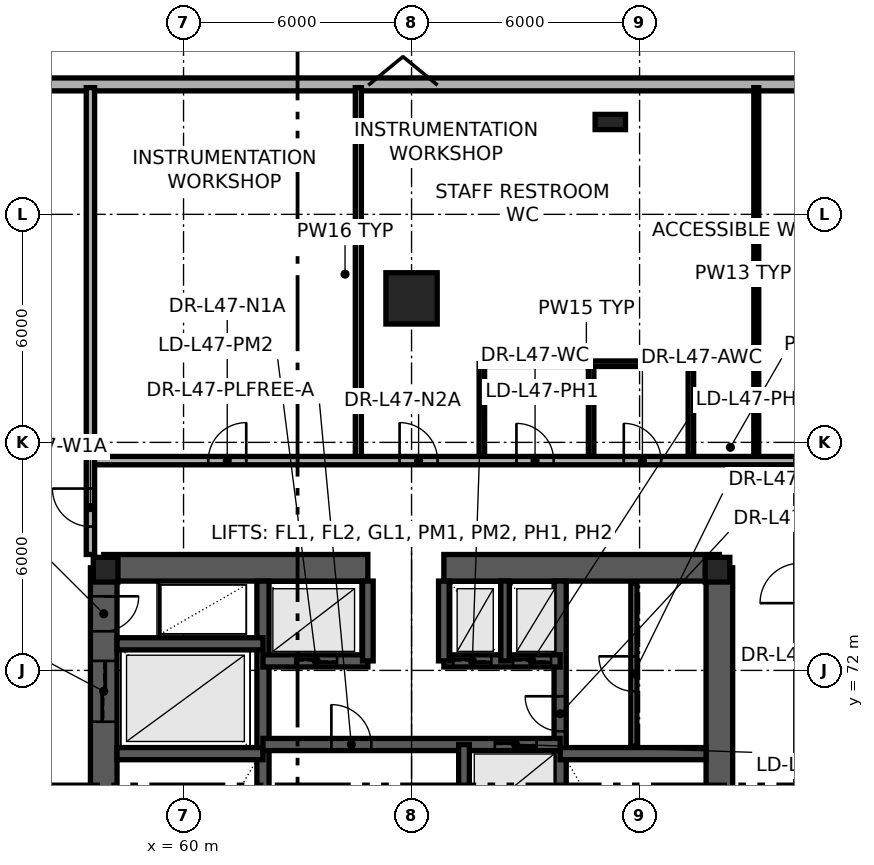
"""IFC4 building model, lengths in metres.
Left out: names, types, materials, properties, quantities, classifications, styles, units other than length and angle.
Written with IfcOpenShell. Run it as: python <this file> out.ifc"""

import sys

from ifc_helpers import new_model, si_unit, direction, frame, frame_2d, origin, origin_2d, place, context, subcontext, project, spatial, rectangle, extrude, element, fill, save


model = new_model("IFC4")
c1 = context("Model", 3, precision=1e-05, world=origin(), true_north=direction((0.0, 1.0)))
c2 = subcontext(c1, "Body", "Model", "MODEL_VIEW")
j1 = project(units=[si_unit("LENGTHUNIT", "METRE"), si_unit("PLANEANGLEUNIT", "RADIAN")], contexts=[c1])
p1 = place(None, origin())
s1 = spatial("IfcSite", under=j1, at=p1, CompositionType="ELEMENT")
p2 = place(p1, origin())
s2 = spatial("IfcBuilding", under=s1, at=p2, CompositionType="ELEMENT")
p3 = place(p2, frame((0.0, 0.0, 179.4)))
s3 = spatial("IfcBuildingStorey", under=s2, at=p3, CompositionType="ELEMENT", Elevation=179.4)
p4 = place(p3, frame((74.1, 61.3, 0.0), z_axis=(0.0, 0.0, 1.0), x_axis=(0.0, 1.0, 0.0)))
e1 = element("IfcWall", 1, at=p4, inside=s3, PredefinedType="SHEAR", context=c2, shape_type="SweptSolid", body=[
    extrude(rectangle(XDim=13.4, YDim=0.7, at=frame_2d((6.7, 0.0))), origin(), (0.0, 0.0, 1.0), 3.65),
])
p5 = place(p3, frame((74.1, 74.7, 0.0), z_axis=(0.0, 0.0, 1.0), x_axis=(-1.0, 0.0, 0.0)))
e2 = element("IfcWall", 2, at=p5, inside=s3, PredefinedType="SHEAR", context=c2, shape_type="SweptSolid", body=[
    extrude(rectangle(XDim=7.25, YDim=0.7, at=frame_2d((3.625, 0.0))), origin(), (0.0, 0.0, 1.0), 3.65),
])
p6 = place(p3, frame((64.85, 74.7, 0.0), z_axis=(0.0, 0.0, 1.0), x_axis=(-1.0, 0.0, 0.0)))
e3 = element("IfcWall", 3, at=p6, inside=s3, PredefinedType="SHEAR", context=c2, shape_type="SweptSolid", body=[
    extrude(rectangle(XDim=6.95, YDim=0.7, at=frame_2d((3.475, 0.0))), origin(), (0.0, 0.0, 1.0), 3.65),
])
p7 = place(p3, frame((57.9, 74.7, 0.0), z_axis=(0.0, 0.0, 1.0), x_axis=(0.0, -1.0, 0.0)))
e4 = element("IfcWall", 4, at=p7, inside=s3, PredefinedType="SHEAR", context=c2, shape_type="SweptSolid", body=[
    extrude(rectangle(XDim=13.4, YDim=0.7, at=frame_2d((6.7, 0.0))), origin(), (0.0, 0.0, 1.0), 3.65),
])
p8 = place(p7, frame((0.75, 0.0, 0.0)))
e5 = element("IfcOpeningElement", 5, at=p8, cuts=e4, PredefinedType="OPENING", context=c2, shape_type="SweptSolid", body=[
    extrude(rectangle(XDim=0.92, YDim=2.05, at=frame_2d((0.46, 1.025))), frame((0.0, 0.36, 0.0), z_axis=(0.0, -1.0, 0.0), x_axis=(1.0, 0.0, 0.0)), (0.0, 0.0, 1.0), 0.72),
])
p9 = place(p7, frame((2.45, 0.0, 0.0)))
e6 = element("IfcOpeningElement", 6, at=p9, cuts=e4, PredefinedType="OPENING", context=c2, shape_type="SweptSolid", body=[
    extrude(rectangle(XDim=1.6, YDim=2.3, at=frame_2d((0.8, 1.15))), frame((0.0, 0.36, 0.0), z_axis=(0.0, -1.0, 0.0), x_axis=(1.0, 0.0, 0.0)), (0.0, 0.0, 1.0), 0.72),
])
p10 = place(p3, frame((62.09, 61.65, 0.0), z_axis=(0.0, 0.0, 1.0), x_axis=(0.0, 1.0, 0.0)))
e7 = element("IfcWall", 7, at=p10, inside=s3, PredefinedType="SHEAR", context=c2, shape_type="SweptSolid", body=[
    extrude(rectangle(XDim=12.7, YDim=0.32, at=frame_2d((6.35, 0.0))), origin(), (0.0, 0.0, 1.0), 3.65),
])
p11 = place(p10, frame((0.55, 0.0, 0.0)))
e8 = element("IfcOpeningElement", 8, at=p11, cuts=e7, PredefinedType="OPENING", context=c2, shape_type="SweptSolid", body=[
    extrude(rectangle(XDim=1.15, YDim=2.15, at=frame_2d((0.575, 1.075))), frame((0.0, 0.17, 0.0), z_axis=(0.0, -1.0, 0.0), x_axis=(1.0, 0.0, 0.0)), (0.0, 0.0, 1.0), 0.34),
])
p12 = place(p3, frame((69.91, 61.65, 0.0), z_axis=(0.0, 0.0, 1.0), x_axis=(0.0, 1.0, 0.0)))
e9 = element("IfcWall", 9, at=p12, inside=s3, PredefinedType="SHEAR", context=c2, shape_type="SweptSolid", body=[
    extrude(rectangle(XDim=12.7, YDim=0.32, at=frame_2d((6.35, 0.0))), origin(), (0.0, 0.0, 1.0), 3.65),
])
p13 = place(p12, frame((8.75, 0.0, 0.0)))
e10 = element("IfcOpeningElement", 10, at=p13, cuts=e9, PredefinedType="OPENING", context=c2, shape_type="SweptSolid", body=[
    extrude(rectangle(XDim=0.92, YDim=2.05, at=frame_2d((0.46, 1.025))), frame((0.0, 0.17, 0.0), z_axis=(0.0, -1.0, 0.0), x_axis=(1.0, 0.0, 0.0)), (0.0, 0.0, 1.0), 0.34),
])
for number, where, z_axis, x_axis in (
    (11, (58.25, 69.81, 0.0), (0.0, 0.0, 1.0), (1.0, 0.0, 0.0)),
    (12, (69.91, 69.81, 0.0), (0.0, 0.0, 1.0), (1.0, 0.0, 0.0)),
    (13, (58.25, 72.7, 0.0), (0.0, 0.0, 1.0), (1.0, 0.0, 0.0)),
):
    element("IfcWall", number, at=place(p3, frame(where, z_axis=z_axis, x_axis=x_axis)), inside=s3, PredefinedType="SHEAR", context=c2, shape_type="SweptSolid", body=[
        extrude(rectangle(XDim=3.84, YDim=0.32, at=frame_2d((1.92, 0.0))), origin(), (0.0, 0.0, 1.0), 3.65),
    ])
p14 = place(p3, frame((62.09, 70.05, 0.0), z_axis=(0.0, 0.0, 1.0), x_axis=(1.0, 0.0, 0.0)))
e14 = element("IfcWall", 14, at=p14, inside=s3, PredefinedType="SHEAR", context=c2, shape_type="SweptSolid", body=[
    extrude(rectangle(XDim=7.82, YDim=0.32, at=frame_2d((3.91, 0.0))), origin(), (0.0, 0.0, 1.0), 3.65),
])
p15 = place(p14, frame((1.8, 0.0, 0.0)))
e15 = element("IfcOpeningElement", 15, at=p15, cuts=e14, PredefinedType="OPENING", context=c2, shape_type="SweptSolid", body=[
    extrude(rectangle(XDim=1.05, YDim=2.15, at=frame_2d((0.525, 1.075))), frame((0.0, 0.17, 0.0), z_axis=(0.0, -1.0, 0.0), x_axis=(1.0, 0.0, 0.0)), (0.0, 0.0, 1.0), 0.34),
])
p16 = place(p14, frame((6.1, 0.0, 0.0)))
e16 = element("IfcOpeningElement", 16, at=p16, cuts=e14, PredefinedType="OPENING", context=c2, shape_type="SweptSolid", body=[
    extrude(rectangle(XDim=1.1, YDim=2.2, at=frame_2d((0.55, 1.1))), frame((0.0, 0.17, 0.0), z_axis=(0.0, -1.0, 0.0), x_axis=(1.0, 0.0, 0.0)), (0.0, 0.0, 1.0), 0.34),
])
p17 = place(p3, frame((62.09, 72.25, 0.0), z_axis=(0.0, 0.0, 1.0), x_axis=(1.0, 0.0, 0.0)))
e17 = element("IfcWall", 17, at=p17, inside=s3, PredefinedType="SHEAR", context=c2, shape_type="SweptSolid", body=[
    extrude(rectangle(XDim=2.76, YDim=0.32, at=frame_2d((1.38, 0.0))), origin(), (0.0, 0.0, 1.0), 3.65),
])
p18 = place(p17, frame((0.85, 0.0, 0.0)))
e18 = element("IfcOpeningElement", 18, at=p18, cuts=e17, PredefinedType="OPENING", context=c2, shape_type="SweptSolid", body=[
    extrude(rectangle(XDim=1.1, YDim=2.2, at=frame_2d((0.55, 1.1))), frame((0.0, 0.17, 0.0), z_axis=(0.0, -1.0, 0.0), x_axis=(1.0, 0.0, 0.0)), (0.0, 0.0, 1.0), 0.34),
])
p19 = place(p3, frame((66.85, 72.25, 0.0), z_axis=(0.0, 0.0, 1.0), x_axis=(1.0, 0.0, 0.0)))
e19 = element("IfcWall", 19, at=p19, inside=s3, PredefinedType="SHEAR", context=c2, shape_type="SweptSolid", body=[
    extrude(rectangle(XDim=3.06, YDim=0.32, at=frame_2d((1.53, 0.0))), origin(), (0.0, 0.0, 1.0), 3.65),
])
p20 = place(p19, frame((0.25, 0.0, 0.0)))
e20 = element("IfcOpeningElement", 20, at=p20, cuts=e19, PredefinedType="OPENING", context=c2, shape_type="SweptSolid", body=[
    extrude(rectangle(XDim=1.0, YDim=2.2, at=frame_2d((0.5, 1.1))), frame((0.0, 0.17, 0.0), z_axis=(0.0, -1.0, 0.0), x_axis=(1.0, 0.0, 0.0)), (0.0, 0.0, 1.0), 0.34),
])
p21 = place(p19, frame((1.82, 0.0, 0.0)))
e21 = element("IfcOpeningElement", 21, at=p21, cuts=e19, PredefinedType="OPENING", context=c2, shape_type="SweptSolid", body=[
    extrude(rectangle(XDim=1.0, YDim=2.2, at=frame_2d((0.5, 1.1))), frame((0.0, 0.17, 0.0), z_axis=(0.0, -1.0, 0.0), x_axis=(1.0, 0.0, 0.0)), (0.0, 0.0, 1.0), 0.34),
])
for number, where, z_axis, x_axis in (
    (22, (64.85, 72.25, 0.0), (0.0, 0.0, 1.0), (0.0, 1.0, 0.0)),
    (23, (66.85, 72.25, 0.0), (0.0, 0.0, 1.0), (0.0, 1.0, 0.0)),
):
    element("IfcWall", number, at=place(p3, frame(where, z_axis=z_axis, x_axis=x_axis)), inside=s3, PredefinedType="SHEAR", context=c2, shape_type="SweptSolid", body=[
        extrude(rectangle(XDim=2.1, YDim=0.28, at=frame_2d((1.05, 0.0))), origin(), (0.0, 0.0, 1.0), 3.65),
    ])
p22 = place(p3, frame((68.46, 72.25, 0.0), z_axis=(0.0, 0.0, 1.0), x_axis=(0.0, 1.0, 0.0)))
e24 = element("IfcWall", 24, at=p22, inside=s3, PredefinedType="SHEAR", context=c2, shape_type="SweptSolid", body=[
    extrude(rectangle(XDim=2.1, YDim=0.22, at=frame_2d((1.05, 0.0))), origin(), (0.0, 0.0, 1.0), 3.65),
])
p23 = place(p3, frame((67.38, 67.8, 0.0), z_axis=(0.0, 0.0, 1.0), x_axis=(0.0, 1.0, 0.0)))
e25 = element("IfcWall", 25, at=p23, inside=s3, PredefinedType="SHEAR", context=c2, shape_type="SweptSolid", body=[
    extrude(rectangle(XDim=2.25, YDim=0.28, at=frame_2d((1.125, 0.0))), origin(), (0.0, 0.0, 1.0), 3.65),
])
for number, where, z_axis, x_axis in (
    (26, (74.05, 74.65, 0.0), (0.0, 0.0, 1.0), (1.0, 0.0, 0.0)),
    (27, (57.95, 74.65, 0.0), (0.0, 0.0, 1.0), (1.0, 0.0, 0.0)),
):
    element("IfcColumn", number, at=place(p3, frame(where, z_axis=z_axis, x_axis=x_axis)), inside=s3, PredefinedType="COLUMN", context=c2, shape_type="SweptSolid", body=[
        extrude(rectangle(XDim=0.65, YDim=0.65, at=origin_2d()), origin(), (0.0, 0.0, 1.0), 3.65),
    ])
p24 = place(p3, frame((66.0, 81.789, 0.0), z_axis=(0.0, 0.0, 1.0), x_axis=(1.0, 0.0, 0.0)))
e28 = element("IfcColumn", 28, at=p24, inside=s3, PredefinedType="COLUMN", context=c2, shape_type="SweptSolid", body=[
    extrude(rectangle(XDim=1.35, YDim=1.35, at=origin_2d()), origin(), (0.0, 0.0, 1.0), 3.65),
])
p25 = place(p3, frame((71.252, 86.491, 0.003), z_axis=(-0.01238655289, -0.033544124313, 0.999360478022), x_axis=(-0.9380871136, 0.346399433166, 0.0)))
e29 = element("IfcColumn", 29, at=p25, inside=s3, PredefinedType="PILASTER", context=c2, shape_type="SweptSolid", body=[
    extrude(rectangle(XDim=0.8, YDim=0.4, at=origin_2d()), origin(), (0.0, 0.0, 1.0), 3.646),
])
p26 = place(p3, frame((61.232, 30.296, 0.0), z_axis=(0.0, 0.0, 1.0), x_axis=(-0.399091286562, 0.916911197985, 0.0)))
e30 = element("IfcWall", 30, at=p26, inside=s3, PredefinedType="STANDARD", context=c2, shape_type="SweptSolid", body=[
    extrude(rectangle(XDim=54.364, YDim=0.34, at=frame_2d((27.182, 0.0))), origin(), (0.0, 0.0, 1.0), 0.85),
])
p27 = place(p3, frame((44.304, 87.419, 0.0), z_axis=(0.0, 0.0, 1.0), x_axis=(1.0, 0.0, 0.0)))
e31 = element("IfcWall", 31, at=p27, inside=s3, PredefinedType="STANDARD", context=c2, shape_type="SweptSolid", body=[
    extrude(rectangle(XDim=43.393, YDim=0.34, at=frame_2d((21.696, 0.0))), origin(), (0.0, 0.0, 1.0), 0.85),
])
p28 = place(p3, frame((92.464, 80.144, 0.0), z_axis=(0.0, 0.0, 1.0), x_axis=(-0.399091286562, -0.916911197985, 0.0)))
e32 = element("IfcWall", 32, at=p28, inside=s3, PredefinedType="STANDARD", context=c2, shape_type="SweptSolid", body=[
    extrude(rectangle(XDim=54.364, YDim=0.34, at=frame_2d((27.182, 0.0))), origin(), (0.0, 0.0, 1.0), 0.85),
])
p29 = place(p3, frame((71.85, 70.0, 0.0), z_axis=(0.0, 0.0, 1.0), x_axis=(0.0, 1.0, 0.0)))
e33 = element("IfcWall", 33, at=p29, inside=s3, PredefinedType="PARTITIONING", context=c2, shape_type="SweptSolid", body=[
    extrude(rectangle(XDim=4.3, YDim=0.16, at=frame_2d((2.15, 0.0))), origin(), (0.0, 0.0, 1.0), 3.4),
])
p30 = place(p29, frame((1.45, 0.0, 0.0)))
e34 = element("IfcOpeningElement", 34, at=p30, cuts=e33, PredefinedType="OPENING", context=c2, shape_type="SweptSolid", body=[
    extrude(rectangle(XDim=0.92, YDim=2.05, at=frame_2d((0.46, 1.025))), frame((0.0, 0.09, 0.0), z_axis=(0.0, -1.0, 0.0), x_axis=(1.0, 0.0, 0.0)), (0.0, 0.0, 1.0), 0.18),
])
for number, where, z_axis, x_axis in (
    (35, (67.85, 77.52, 0.0), (0.0, 0.0, 1.0), (0.0, 1.0, 0.0)),
    (36, (70.725, 77.52, 0.0), (0.0, 0.0, 1.0), (0.0, 1.0, 0.0)),
):
    element("IfcWall", number, at=place(p3, frame(where, z_axis=z_axis, x_axis=x_axis)), inside=s3, PredefinedType="PARTITIONING", context=c2, shape_type="SweptSolid", body=[
        extrude(rectangle(XDim=2.55, YDim=0.145, at=frame_2d((1.275, 0.0))), origin(), (0.0, 0.0, 1.0), 2.78),
    ])
p31 = place(p3, frame((73.35, 77.52, 0.0), z_axis=(0.0, 0.0, 1.0), x_axis=(0.0, 1.0, 0.0)))
e37 = element("IfcWall", 37, at=p31, inside=s3, PredefinedType="PARTITIONING", context=c2, shape_type="SweptSolid", body=[
    extrude(rectangle(XDim=2.55, YDim=0.145, at=frame_2d((1.275, 0.0))), origin(), (0.0, 0.0, 1.0), 3.4),
])
p32 = place(p3, frame((67.85, 80.07, 0.0), z_axis=(0.0, 0.0, 1.0), x_axis=(1.0, 0.0, 0.0)))
e38 = element("IfcWall", 38, at=p32, inside=s3, PredefinedType="PARTITIONING", context=c2, shape_type="SweptSolid", body=[
    extrude(rectangle(XDim=5.5, YDim=0.145, at=frame_2d((2.75, 0.0))), origin(), (0.0, 0.0, 1.0), 2.78),
])
p33 = place(p3, frame((64.6, 77.52, 0.0), z_axis=(0.0, 0.0, 1.0), x_axis=(0.0, 1.0, 0.0)))
e39 = element("IfcWall", 39, at=p33, inside=s3, PredefinedType="PARTITIONING", context=c2, shape_type="SweptSolid", body=[
    extrude(rectangle(XDim=9.814, YDim=0.16, at=frame_2d((4.907, 0.0))), origin(), (0.0, 0.0, 1.0), 2.6),
])
p34 = place(p3, frame((75.071, 77.52, 0.0), z_axis=(0.0, 0.0, 1.0), x_axis=(0.0, 1.0, 0.0)))
e40 = element("IfcWall", 40, at=p34, inside=s3, PredefinedType="PARTITIONING", context=c2, shape_type="SweptSolid", body=[
    extrude(rectangle(XDim=9.814, YDim=0.13, at=frame_2d((4.907, 0.0))), origin(), (0.0, 0.0, 1.0), 2.6),
])
p35 = place(p3, frame((57.55, 77.52, 0.0), z_axis=(0.0, 0.0, 1.0), x_axis=(1.0, 0.0, 0.0)))
e41 = element("IfcWall", 41, at=p35, inside=s3, PredefinedType="PARTITIONING", context=c2, shape_type="SweptSolid", body=[
    extrude(rectangle(XDim=33.679, YDim=0.22, at=frame_2d((16.84, 0.0))), origin(), (0.0, 0.0, 1.0), 2.6),
])
p36 = place(p35, frame((11.21, 0.0, 0.0)))
e42 = element("IfcOpeningElement", 42, at=p36, cuts=e41, PredefinedType="OPENING", context=c2, shape_type="SweptSolid", body=[
    extrude(rectangle(XDim=0.98, YDim=2.1, at=frame_2d((0.49, 1.05))), frame((0.0, 0.12, 0.0), z_axis=(0.0, -1.0, 0.0), x_axis=(1.0, 0.0, 0.0)), (0.0, 0.0, 1.0), 0.24),
])
p37 = place(p35, frame((14.035, 0.0, 0.0)))
e43 = element("IfcOpeningElement", 43, at=p37, cuts=e41, PredefinedType="OPENING", context=c2, shape_type="SweptSolid", body=[
    extrude(rectangle(XDim=0.98, YDim=2.1, at=frame_2d((0.49, 1.05))), frame((0.0, 0.12, 0.0), z_axis=(0.0, -1.0, 0.0), x_axis=(1.0, 0.0, 0.0)), (0.0, 0.0, 1.0), 0.24),
])
p38 = place(p35, frame((3.1, 0.0, 0.0)))
e44 = element("IfcOpeningElement", 44, at=p38, cuts=e41, PredefinedType="OPENING", context=c2, shape_type="SweptSolid", body=[
    extrude(rectangle(XDim=1.0, YDim=2.1, at=frame_2d((0.5, 1.05))), frame((0.0, 0.12, 0.0), z_axis=(0.0, -1.0, 0.0), x_axis=(1.0, 0.0, 0.0)), (0.0, 0.0, 1.0), 0.24),
])
p39 = place(p35, frame((8.135, 0.0, 0.0)))
e45 = element("IfcOpeningElement", 45, at=p39, cuts=e41, PredefinedType="OPENING", context=c2, shape_type="SweptSolid", body=[
    extrude(rectangle(XDim=1.0, YDim=2.1, at=frame_2d((0.5, 1.05))), frame((0.0, 0.12, 0.0), z_axis=(0.0, -1.0, 0.0), x_axis=(1.0, 0.0, 0.0)), (0.0, 0.0, 1.0), 0.24),
])
p40 = place(p35, frame((21.401, 0.0, 0.0)))
e46 = element("IfcOpeningElement", 46, at=p40, cuts=e41, PredefinedType="OPENING", context=c2, shape_type="SweptSolid", body=[
    extrude(rectangle(XDim=1.0, YDim=2.1, at=frame_2d((0.5, 1.05))), frame((0.0, 0.12, 0.0), z_axis=(0.0, -1.0, 0.0), x_axis=(1.0, 0.0, 0.0)), (0.0, 0.0, 1.0), 0.24),
])
p41 = place(p35, frame((29.405, 0.0, 0.0)))
e47 = element("IfcOpeningElement", 47, at=p41, cuts=e41, PredefinedType="OPENING", context=c2, shape_type="SweptSolid", body=[
    extrude(rectangle(XDim=1.0, YDim=2.1, at=frame_2d((0.5, 1.05))), frame((0.0, 0.12, 0.0), z_axis=(0.0, -1.0, 0.0), x_axis=(1.0, 0.0, 0.0)), (0.0, 0.0, 1.0), 0.24),
])
p42 = place(p3, frame((57.55, 75.05, 0.0), z_axis=(0.0, 0.0, 1.0), x_axis=(0.0, 1.0, 0.0)))
e48 = element("IfcWall", 48, at=p42, inside=s3, PredefinedType="PARTITIONING", context=c2, shape_type="SweptSolid", body=[
    extrude(rectangle(XDim=12.284, YDim=0.22, at=frame_2d((6.142, 0.0))), origin(), (0.0, 0.0, 1.0), 2.6),
])
p43 = place(p42, frame((0.735, 0.0, 0.0)))
e49 = element("IfcOpeningElement", 49, at=p43, cuts=e48, PredefinedType="OPENING", context=c2, shape_type="SweptSolid", body=[
    extrude(rectangle(XDim=1.0, YDim=2.1, at=frame_2d((0.5, 1.05))), frame((0.0, 0.12, 0.0), z_axis=(0.0, -1.0, 0.0), x_axis=(1.0, 0.0, 0.0)), (0.0, 0.0, 1.0), 0.24),
])
p44 = place(p15, origin())
e50 = element("IfcDoor", 50, at=p44, inside=s3, OperationType="SINGLE_SWING_LEFT", PredefinedType="DOOR", context=c2, shape_type="SweptSolid", body=[
    extrude(rectangle(XDim=1.05, YDim=2.15, at=frame_2d((0.525, 1.075))), frame((0.0, 0.025, 0.0), z_axis=(0.0, -1.0, 0.0), x_axis=(1.0, 0.0, 0.0)), (0.0, 0.0, 1.0), 0.05),
])
fill(e15, e50)
p45 = place(p16, origin())
e51 = element("IfcDoor", 51, at=p45, inside=s3, OperationType="SLIDING_TO_LEFT", PredefinedType="DOOR", context=c2, shape_type="SweptSolid", body=[
    extrude(rectangle(XDim=1.1, YDim=2.2, at=frame_2d((0.55, 1.1))), frame((0.0, 0.025, 0.0), z_axis=(0.0, -1.0, 0.0), x_axis=(1.0, 0.0, 0.0)), (0.0, 0.0, 1.0), 0.05),
])
fill(e16, e51)
p46 = place(p18, origin())
e52 = element("IfcDoor", 52, at=p46, inside=s3, OperationType="SLIDING_TO_LEFT", PredefinedType="DOOR", context=c2, shape_type="SweptSolid", body=[
    extrude(rectangle(XDim=1.1, YDim=2.2, at=frame_2d((0.55, 1.1))), frame((0.0, 0.025, 0.0), z_axis=(0.0, -1.0, 0.0), x_axis=(1.0, 0.0, 0.0)), (0.0, 0.0, 1.0), 0.05),
])
fill(e18, e52)
p47 = place(p20, origin())
e53 = element("IfcDoor", 53, at=p47, inside=s3, OperationType="SLIDING_TO_LEFT", PredefinedType="DOOR", context=c2, shape_type="SweptSolid", body=[
    extrude(rectangle(XDim=1.0, YDim=2.2, at=frame_2d((0.5, 1.1))), frame((0.0, 0.025, 0.0), z_axis=(0.0, -1.0, 0.0), x_axis=(1.0, 0.0, 0.0)), (0.0, 0.0, 1.0), 0.05),
])
fill(e20, e53)
p48 = place(p21, origin())
e54 = element("IfcDoor", 54, at=p48, inside=s3, OperationType="SLIDING_TO_LEFT", PredefinedType="DOOR", context=c2, shape_type="SweptSolid", body=[
    extrude(rectangle(XDim=1.0, YDim=2.2, at=frame_2d((0.5, 1.1))), frame((0.0, 0.025, 0.0), z_axis=(0.0, -1.0, 0.0), x_axis=(1.0, 0.0, 0.0)), (0.0, 0.0, 1.0), 0.05),
])
fill(e21, e54)
p49 = place(p8, origin())
e55 = element("IfcDoor", 55, at=p49, inside=s3, OperationType="SINGLE_SWING_LEFT", PredefinedType="DOOR", context=c2, shape_type="SweptSolid", body=[
    extrude(rectangle(XDim=0.92, YDim=2.05, at=frame_2d((0.46, 1.025))), frame((0.0, 0.025, 0.0), z_axis=(0.0, -1.0, 0.0), x_axis=(1.0, 0.0, 0.0)), (0.0, 0.0, 1.0), 0.05),
])
fill(e5, e55)
p50 = place(p9, origin())
e56 = element("IfcDoor", 56, at=p50, inside=s3, OperationType="DOUBLE_DOOR_SLIDING", PredefinedType="DOOR", context=c2, shape_type="SweptSolid", body=[
    extrude(rectangle(XDim=1.6, YDim=2.3, at=frame_2d((0.8, 1.15))), frame((0.0, 0.025, 0.0), z_axis=(0.0, -1.0, 0.0), x_axis=(1.0, 0.0, 0.0)), (0.0, 0.0, 1.0), 0.05),
])
fill(e6, e56)
p51 = place(p13, origin())
e57 = element("IfcDoor", 57, at=p51, inside=s3, OperationType="SINGLE_SWING_RIGHT", PredefinedType="DOOR", context=c2, shape_type="SweptSolid", body=[
    extrude(rectangle(XDim=0.92, YDim=2.05, at=frame_2d((0.46, 1.025))), frame((0.0, 0.025, 0.0), z_axis=(0.0, -1.0, 0.0), x_axis=(1.0, 0.0, 0.0)), (0.0, 0.0, 1.0), 0.05),
])
fill(e10, e57)
p52 = place(p30, origin())
e58 = element("IfcDoor", 58, at=p52, inside=s3, OperationType="SINGLE_SWING_RIGHT", PredefinedType="DOOR", context=c2, shape_type="SweptSolid", body=[
    extrude(rectangle(XDim=0.92, YDim=2.05, at=frame_2d((0.46, 1.025))), frame((0.0, 0.025, 0.0), z_axis=(0.0, -1.0, 0.0), x_axis=(1.0, 0.0, 0.0)), (0.0, 0.0, 1.0), 0.05),
])
fill(e34, e58)
p53 = place(p36, origin())
e59 = element("IfcDoor", 59, at=p53, inside=s3, OperationType="SINGLE_SWING_LEFT", PredefinedType="DOOR", context=c2, shape_type="SweptSolid", body=[
    extrude(rectangle(XDim=0.98, YDim=2.1, at=frame_2d((0.49, 1.05))), frame((0.0, 0.025, 0.0), z_axis=(0.0, -1.0, 0.0), x_axis=(1.0, 0.0, 0.0)), (0.0, 0.0, 1.0), 0.05),
])
fill(e42, e59)
p54 = place(p37, origin())
e60 = element("IfcDoor", 60, at=p54, inside=s3, OperationType="SINGLE_SWING_LEFT", PredefinedType="DOOR", context=c2, shape_type="SweptSolid", body=[
    extrude(rectangle(XDim=0.98, YDim=2.1, at=frame_2d((0.49, 1.05))), frame((0.0, 0.025, 0.0), z_axis=(0.0, -1.0, 0.0), x_axis=(1.0, 0.0, 0.0)), (0.0, 0.0, 1.0), 0.05),
])
fill(e43, e60)
p55 = place(p38, origin())
e61 = element("IfcDoor", 61, at=p55, inside=s3, OperationType="SINGLE_SWING_RIGHT", PredefinedType="DOOR", context=c2, shape_type="SweptSolid", body=[
    extrude(rectangle(XDim=1.0, YDim=2.1, at=frame_2d((0.5, 1.05))), frame((0.0, 0.025, 0.0), z_axis=(0.0, -1.0, 0.0), x_axis=(1.0, 0.0, 0.0)), (0.0, 0.0, 1.0), 0.05),
])
fill(e44, e61)
p56 = place(p39, origin())
e62 = element("IfcDoor", 62, at=p56, inside=s3, OperationType="SINGLE_SWING_LEFT", PredefinedType="DOOR", context=c2, shape_type="SweptSolid", body=[
    extrude(rectangle(XDim=1.0, YDim=2.1, at=frame_2d((0.5, 1.05))), frame((0.0, 0.025, 0.0), z_axis=(0.0, -1.0, 0.0), x_axis=(1.0, 0.0, 0.0)), (0.0, 0.0, 1.0), 0.05),
])
fill(e45, e62)
p57 = place(p43, origin())
e63 = element("IfcDoor", 63, at=p57, inside=s3, OperationType="SINGLE_SWING_RIGHT", PredefinedType="DOOR", context=c2, shape_type="SweptSolid", body=[
    extrude(rectangle(XDim=1.0, YDim=2.1, at=frame_2d((0.5, 1.05))), frame((0.0, 0.025, 0.0), z_axis=(0.0, -1.0, 0.0), x_axis=(1.0, 0.0, 0.0)), (0.0, 0.0, 1.0), 0.05),
])
fill(e49, e63)
save(model, sys.argv[1])
